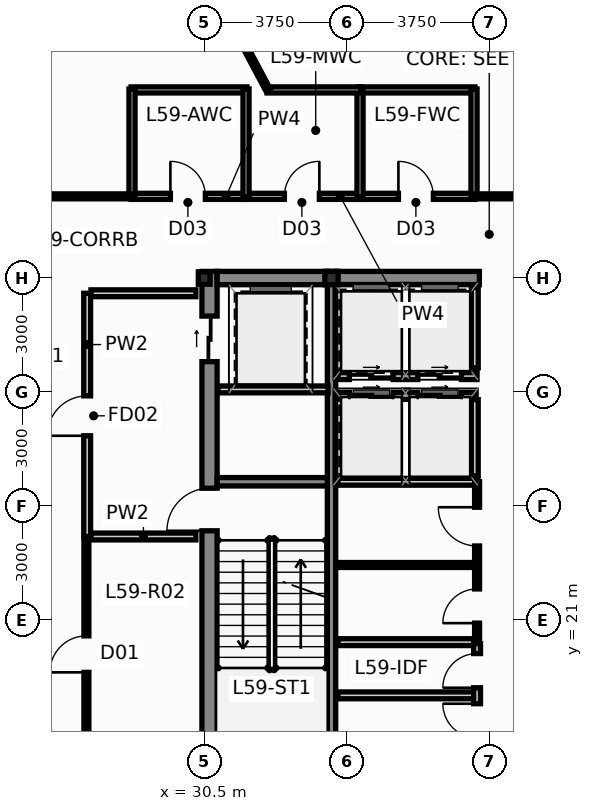
"""IFC4 building model, lengths in metres.
Left out: names, types, materials, properties, quantities, classifications, styles, units other than length and angle.
Written with IfcOpenShell. Run it as: python <this file> out.ifc"""

import sys

from ifc_helpers import new_model, si_unit, direction, frame, frame_2d, origin, origin_2d, place, context, subcontext, project, spatial, rectangle, hollow_rectangle, i_section, extrude, source, transform, mapped, element, fill, save


model = new_model("IFC4")
c1 = context("Model", 3, precision=1e-05, world=origin(), true_north=direction((0.0, 1.0)))
c2 = subcontext(c1, "Body", "Model", "MODEL_VIEW")
j1 = project(units=[si_unit("LENGTHUNIT", "METRE"), si_unit("PLANEANGLEUNIT", "RADIAN")], contexts=[c1])
p1 = place(None, origin())
s1 = spatial("IfcSite", under=j1, at=p1, CompositionType="ELEMENT")
p2 = place(p1, origin())
s2 = spatial("IfcBuilding", under=s1, at=p2, CompositionType="ELEMENT")
p3 = place(p2, frame((0.0, 0.0, 225.35)))
s3 = spatial("IfcBuildingStorey", under=s2, at=p3, CompositionType="ELEMENT", Elevation=225.35)
m1 = source(origin(), c2, "Body", "SweptSolid", [
    extrude(i_section(OverallWidth=0.311, OverallDepth=0.327, WebThickness=0.016, FlangeThickness=0.025, at=origin_2d()), origin(), (0.0, 0.0, 1.0), 4.5),
])
p4 = place(p3, frame((30.5, 30.0, 0.0), z_axis=(0.0, 0.0, 1.0), x_axis=(1.0, 0.0, 0.0)))
e1 = element("IfcColumn", 1, at=p4, inside=s3, PredefinedType="COLUMN", context=c2, shape_type="MappedRepresentation", body=[
    mapped(m1, transform((0.0, 0.0, 0.0), scale=1.0)),
])
m2 = source(origin(), c2, "Body", "SweptSolid", [
    extrude(hollow_rectangle(XDim=0.35, YDim=0.35, WallThickness=0.016, at=origin_2d()), origin(), (0.0, 0.0, 1.0), 4.5),
])
p5 = place(p3, frame((33.85, 30.0, 0.0), z_axis=(0.0, 0.0, 1.0), x_axis=(1.0, 0.0, 0.0)))
e2 = element("IfcColumn", 2, at=p5, inside=s3, PredefinedType="COLUMN", context=c2, shape_type="MappedRepresentation", body=[
    mapped(m2, transform((0.0, 0.0, 0.0), scale=1.0)),
])
p6 = place(p3, frame((30.64, 17.05, 0.0), z_axis=(0.0, 0.0, 1.0), x_axis=(0.0, 1.0, 0.0)))
e3 = element("IfcWall", 3, at=p6, inside=s3, PredefinedType="SHEAR", context=c2, shape_type="SweptSolid", body=[
    extrude(rectangle(XDim=13.125, YDim=0.4, at=frame_2d((6.562, 0.0))), origin(), (0.0, 0.0, 1.0), 4.5),
])
p7 = place(p6, frame((6.3, 0.0, 0.0)))
e4 = element("IfcOpeningElement", 4, at=p7, cuts=e3, PredefinedType="OPENING", context=c2, shape_type="SweptSolid", body=[
    extrude(rectangle(XDim=1.12, YDim=2.15, at=frame_2d((0.56, 1.075))), frame((0.0, 0.212, 0.0), z_axis=(0.0, -1.0, 0.0), x_axis=(1.0, 0.0, 0.0)), (0.0, 0.0, 1.0), 0.424),
])
p8 = place(p6, frame((10.75, 0.0, 0.0)))
e5 = element("IfcOpeningElement", 5, at=p8, cuts=e3, PredefinedType="OPENING", context=c2, shape_type="SweptSolid", body=[
    extrude(rectangle(XDim=1.2, YDim=2.2, at=frame_2d((0.6, 1.1))), frame((0.0, 0.212, 0.0), z_axis=(0.0, -1.0, 0.0), x_axis=(1.0, 0.0, 0.0)), (0.0, 0.0, 1.0), 0.424),
])
p9 = place(p3, frame((30.84, 30.0, 0.0), z_axis=(0.0, 0.0, 1.0), x_axis=(1.0, 0.0, 0.0)))
e6 = element("IfcWall", 6, at=p9, inside=s3, PredefinedType="SHEAR", context=c2, shape_type="SweptSolid", body=[
    extrude(rectangle(XDim=2.9, YDim=0.35, at=frame_2d((1.45, 0.0))), origin(), (0.0, 0.0, 1.0), 4.5),
])
p10 = place(p3, frame((33.96, 30.0, 0.0), z_axis=(0.0, 0.0, 1.0), x_axis=(1.0, 0.0, 0.0)))
e7 = element("IfcWall", 7, at=p10, inside=s3, PredefinedType="SHEAR", context=c2, shape_type="SweptSolid", body=[
    extrude(rectangle(XDim=3.78, YDim=0.35, at=frame_2d((1.89, 0.0))), origin(), (0.0, 0.0, 1.0), 4.5),
])
p11 = place(p3, frame((33.85, 17.05, 0.0), z_axis=(0.0, 0.0, 1.0), x_axis=(0.0, 1.0, 0.0)))
e8 = element("IfcWall", 8, at=p11, inside=s3, PredefinedType="SHEAR", context=c2, shape_type="SweptSolid", body=[
    extrude(rectangle(XDim=13.125, YDim=0.22, at=frame_2d((6.562, 0.0))), origin(), (0.0, 0.0, 1.0), 4.5),
])
p12 = place(p3, frame((30.84, 24.64, 0.0), z_axis=(0.0, 0.0, 1.0), x_axis=(1.0, 0.0, 0.0)))
e9 = element("IfcWall", 9, at=p12, inside=s3, PredefinedType="SHEAR", context=c2, shape_type="SweptSolid", body=[
    extrude(rectangle(XDim=2.9, YDim=0.22, at=frame_2d((1.45, 0.0))), origin(), (0.0, 0.0, 1.0), 4.5),
])
p13 = place(p3, frame((34.02, 26.9, 0.0), z_axis=(0.0, 0.0, 1.0), x_axis=(1.0, 0.0, 0.0)))
e10 = element("IfcWall", 10, at=p13, inside=s3, PredefinedType="PARTITIONING", context=c2, shape_type="SweptSolid", body=[
    extrude(rectangle(XDim=3.6, YDim=0.18, at=frame_2d((1.8, 0.0))), origin(), (0.0, 0.0, 1.0), 4.25),
])
p14 = place(p13, frame((0.3, 0.0, 0.0)))
e11 = element("IfcOpeningElement", 11, at=p14, cuts=e10, PredefinedType="OPENING", context=c2, shape_type="SweptSolid", body=[
    extrude(rectangle(XDim=1.15, YDim=2.2, at=frame_2d((0.575, 1.1))), frame((0.0, 0.102, 0.0), z_axis=(0.0, -1.0, 0.0), x_axis=(1.0, 0.0, 0.0)), (0.0, 0.0, 1.0), 0.204),
])
p15 = place(p13, frame((2.1, 0.0, 0.0)))
e12 = element("IfcOpeningElement", 12, at=p15, cuts=e10, PredefinedType="OPENING", context=c2, shape_type="SweptSolid", body=[
    extrude(rectangle(XDim=1.15, YDim=2.2, at=frame_2d((0.575, 1.1))), frame((0.0, 0.102, 0.0), z_axis=(0.0, -1.0, 0.0), x_axis=(1.0, 0.0, 0.0)), (0.0, 0.0, 1.0), 0.204),
])
p16 = place(p3, frame((37.62, 24.8, 0.0), z_axis=(0.0, 0.0, 1.0), x_axis=(0.0, 1.0, 0.0)))
e13 = element("IfcWall", 13, at=p16, inside=s3, PredefinedType="PARTITIONING", context=c2, shape_type="SweptSolid", body=[
    extrude(rectangle(XDim=2.0, YDim=0.18, at=frame_2d((1.0, 0.0))), origin(), (0.0, 0.0, 1.0), 4.25),
])
p17 = place(p3, frame((34.02, 24.64, 0.0), z_axis=(0.0, 0.0, 1.0), x_axis=(1.0, 0.0, 0.0)))
e14 = element("IfcWall", 14, at=p17, inside=s3, PredefinedType="PARTITIONING", context=c2, shape_type="SweptSolid", body=[
    extrude(rectangle(XDim=3.68, YDim=0.18, at=frame_2d((1.84, 0.0))), origin(), (0.0, 0.0, 1.0), 4.25),
])
p18 = place(p3, frame((34.02, 27.42, 0.0), z_axis=(0.0, 0.0, 1.0), x_axis=(1.0, 0.0, 0.0)))
e15 = element("IfcWall", 15, at=p18, inside=s3, PredefinedType="PARTITIONING", context=c2, shape_type="SweptSolid", body=[
    extrude(rectangle(XDim=3.66, YDim=0.18, at=frame_2d((1.83, 0.0))), origin(), (0.0, 0.0, 1.0), 4.25),
])
p19 = place(p18, frame((0.3, 0.0, 0.0)))
e16 = element("IfcOpeningElement", 16, at=p19, cuts=e15, PredefinedType="OPENING", context=c2, shape_type="SweptSolid", body=[
    extrude(rectangle(XDim=1.15, YDim=2.2, at=frame_2d((0.575, 1.1))), frame((0.0, 0.102, 0.0), z_axis=(0.0, -1.0, 0.0), x_axis=(1.0, 0.0, 0.0)), (0.0, 0.0, 1.0), 0.204),
])
p20 = place(p18, frame((2.1, 0.0, 0.0)))
e17 = element("IfcOpeningElement", 17, at=p20, cuts=e15, PredefinedType="OPENING", context=c2, shape_type="SweptSolid", body=[
    extrude(rectangle(XDim=1.15, YDim=2.2, at=frame_2d((0.575, 1.1))), frame((0.0, 0.102, 0.0), z_axis=(0.0, -1.0, 0.0), x_axis=(1.0, 0.0, 0.0)), (0.0, 0.0, 1.0), 0.204),
])
p21 = place(p3, frame((37.62, 27.64, 0.0), z_axis=(0.0, 0.0, 1.0), x_axis=(0.0, 1.0, 0.0)))
e18 = element("IfcWall", 18, at=p21, inside=s3, PredefinedType="PARTITIONING", context=c2, shape_type="SweptSolid", body=[
    extrude(rectangle(XDim=2.11, YDim=0.18, at=frame_2d((1.055, 0.0))), origin(), (0.0, 0.0, 1.0), 4.25),
])
p22 = place(p3, frame((27.42, 23.2, 0.0), z_axis=(0.0, 0.0, 1.0), x_axis=(0.0, 1.0, 0.0)))
e19 = element("IfcWall", 19, at=p22, inside=s3, PredefinedType="PARTITIONING", context=c2, shape_type="SweptSolid", body=[
    extrude(rectangle(XDim=6.4, YDim=0.18, at=frame_2d((3.2, 0.0))), origin(), (0.0, 0.0, 1.0), 3.935),
])
p23 = place(p22, frame((2.65, 0.0, 0.0)))
e20 = element("IfcOpeningElement", 20, at=p23, cuts=e19, PredefinedType="OPENING", context=c2, shape_type="SweptSolid", body=[
    extrude(rectangle(XDim=1.05, YDim=2.15, at=frame_2d((0.525, 1.075))), frame((0.0, 0.102, 0.0), z_axis=(0.0, -1.0, 0.0), x_axis=(1.0, 0.0, 0.0)), (0.0, 0.0, 1.0), 0.204),
])
p24 = place(p3, frame((27.52, 23.2, 0.0), z_axis=(0.0, 0.0, 1.0), x_axis=(1.0, 0.0, 0.0)))
e21 = element("IfcWall", 21, at=p24, inside=s3, PredefinedType="PARTITIONING", context=c2, shape_type="SweptSolid", body=[
    extrude(rectangle(XDim=2.76, YDim=0.18, at=frame_2d((1.38, 0.0))), origin(), (0.0, 0.0, 1.0), 4.25),
])
p25 = place(p3, frame((27.52, 29.6, 0.0), z_axis=(0.0, 0.0, 1.0), x_axis=(1.0, 0.0, 0.0)))
e22 = element("IfcWall", 22, at=p25, inside=s3, PredefinedType="PARTITIONING", context=c2, shape_type="SweptSolid", body=[
    extrude(rectangle(XDim=2.76, YDim=0.18, at=frame_2d((1.38, 0.0))), origin(), (0.0, 0.0, 1.0), 3.835),
])
p26 = place(p3, frame((30.86, 27.07, 0.0), z_axis=(0.0, 0.0, 1.0), x_axis=(1.0, 0.0, 0.0)))
e23 = element("IfcWall", 23, at=p26, inside=s3, PredefinedType="PARTITIONING", context=c2, shape_type="SweptSolid", body=[
    extrude(rectangle(XDim=2.9, YDim=0.18, at=frame_2d((1.45, 0.0))), origin(), (0.0, 0.0, 1.0), 4.25),
])
p27 = place(p3, frame((34.02, 20.42, 0.0), z_axis=(0.0, 0.0, 1.0), x_axis=(1.0, 0.0, 0.0)))
e24 = element("IfcWall", 24, at=p27, inside=s3, PredefinedType="PARTITIONING", context=c2, shape_type="SweptSolid", body=[
    extrude(rectangle(XDim=3.64, YDim=0.18, at=frame_2d((1.82, 0.0))), origin(), (0.0, 0.0, 1.0), 4.25),
])
p28 = place(p3, frame((34.02, 22.45, 0.0), z_axis=(0.0, 0.0, 1.0), x_axis=(1.0, 0.0, 0.0)))
e25 = element("IfcWall", 25, at=p28, inside=s3, PredefinedType="PARTITIONING", context=c2, shape_type="SweptSolid", body=[
    extrude(rectangle(XDim=3.58, YDim=0.13, at=frame_2d((1.79, 0.0))), origin(), (0.0, 0.0, 1.0), 4.25),
])
p29 = place(p3, frame((37.68, 20.5, 0.0), z_axis=(0.0, 0.0, 1.0), x_axis=(0.0, 1.0, 0.0)))
e26 = element("IfcWall", 26, at=p29, inside=s3, PredefinedType="PARTITIONING", context=c2, shape_type="SweptSolid", body=[
    extrude(rectangle(XDim=4.14, YDim=0.13, at=frame_2d((2.07, 0.0))), origin(), (0.0, 0.0, 1.0), 4.25),
])
p30 = place(p29, frame((0.42, 0.0, 0.0)))
e27 = element("IfcOpeningElement", 27, at=p30, cuts=e26, PredefinedType="OPENING", context=c2, shape_type="SweptSolid", body=[
    extrude(rectangle(XDim=0.9, YDim=2.1, at=frame_2d((0.45, 1.05))), frame((0.0, 0.077, 0.0), z_axis=(0.0, -1.0, 0.0), x_axis=(1.0, 0.0, 0.0)), (0.0, 0.0, 1.0), 0.154),
])
p31 = place(p29, frame((2.45, 0.0, 0.0)))
e28 = element("IfcOpeningElement", 28, at=p31, cuts=e26, PredefinedType="OPENING", context=c2, shape_type="SweptSolid", body=[
    extrude(rectangle(XDim=1.02, YDim=2.15, at=frame_2d((0.51, 1.075))), frame((0.0, 0.077, 0.0), z_axis=(0.0, -1.0, 0.0), x_axis=(1.0, 0.0, 0.0)), (0.0, 0.0, 1.0), 0.154),
])
p32 = place(p3, frame((34.02, 19.02, 0.0), z_axis=(0.0, 0.0, 1.0), x_axis=(1.0, 0.0, 0.0)))
e29 = element("IfcWall", 29, at=p32, inside=s3, PredefinedType="PARTITIONING", context=c2, shape_type="SweptSolid", body=[
    extrude(rectangle(XDim=3.58, YDim=0.18, at=frame_2d((1.79, 0.0))), origin(), (0.0, 0.0, 1.0), 4.25),
])
p33 = place(p3, frame((37.68, 17.68, 0.0), z_axis=(0.0, 0.0, 1.0), x_axis=(0.0, 1.0, 0.0)))
e30 = element("IfcWall", 30, at=p33, inside=s3, PredefinedType="PARTITIONING", context=c2, shape_type="SweptSolid", body=[
    extrude(rectangle(XDim=2.7, YDim=0.18, at=frame_2d((1.35, 0.0))), origin(), (0.0, 0.0, 1.0), 4.25),
])
p34 = place(p33, frame((0.22, 0.0, 0.0)))
e31 = element("IfcOpeningElement", 31, at=p34, cuts=e30, PredefinedType="OPENING", context=c2, shape_type="SweptSolid", body=[
    extrude(rectangle(XDim=0.9, YDim=2.1, at=frame_2d((0.45, 1.05))), frame((0.0, 0.102, 0.0), z_axis=(0.0, -1.0, 0.0), x_axis=(1.0, 0.0, 0.0)), (0.0, 0.0, 1.0), 0.204),
])
p35 = place(p33, frame((1.54, 0.0, 0.0)))
e32 = element("IfcOpeningElement", 32, at=p35, cuts=e30, PredefinedType="OPENING", context=c2, shape_type="SweptSolid", body=[
    extrude(rectangle(XDim=0.9, YDim=2.1, at=frame_2d((0.45, 1.05))), frame((0.0, 0.102, 0.0), z_axis=(0.0, -1.0, 0.0), x_axis=(1.0, 0.0, 0.0)), (0.0, 0.0, 1.0), 0.204),
])
p36 = place(p3, frame((28.575, 32.15, 0.0), z_axis=(0.0, 0.0, 1.0), x_axis=(1.0, 0.0, 0.0)))
e33 = element("IfcWall", 33, at=p36, inside=s3, PredefinedType="PLUMBINGWALL", context=c2, shape_type="SweptSolid", body=[
    extrude(rectangle(XDim=3.05, YDim=0.16, at=frame_2d((1.525, 0.0))), origin(), (0.0, 0.0, 1.0), 3.935),
])
p37 = place(p36, frame((1.035, 0.0, 0.0)))
e34 = element("IfcOpeningElement", 34, at=p37, cuts=e33, PredefinedType="OPENING", context=c2, shape_type="SweptSolid", body=[
    extrude(rectangle(XDim=0.92, YDim=2.1, at=frame_2d((0.46, 1.05))), frame((0.0, 0.092, 0.0), z_axis=(0.0, -1.0, 0.0), x_axis=(1.0, 0.0, 0.0)), (0.0, 0.0, 1.0), 0.184),
])
p38 = place(p3, frame((31.575, 32.15, 0.0), z_axis=(0.0, 0.0, 1.0), x_axis=(1.0, 0.0, 0.0)))
e35 = element("IfcWall", 35, at=p38, inside=s3, PredefinedType="PLUMBINGWALL", context=c2, shape_type="SweptSolid", body=[
    extrude(rectangle(XDim=3.05, YDim=0.16, at=frame_2d((1.525, 0.0))), origin(), (0.0, 0.0, 1.0), 3.935),
])
p39 = place(p38, frame((1.035, 0.0, 0.0)))
e36 = element("IfcOpeningElement", 36, at=p39, cuts=e35, PredefinedType="OPENING", context=c2, shape_type="SweptSolid", body=[
    extrude(rectangle(XDim=0.92, YDim=2.1, at=frame_2d((0.46, 1.05))), frame((0.0, 0.092, 0.0), z_axis=(0.0, -1.0, 0.0), x_axis=(1.0, 0.0, 0.0)), (0.0, 0.0, 1.0), 0.184),
])
p40 = place(p3, frame((34.575, 32.15, 0.0), z_axis=(0.0, 0.0, 1.0), x_axis=(1.0, 0.0, 0.0)))
e37 = element("IfcWall", 37, at=p40, inside=s3, PredefinedType="PLUMBINGWALL", context=c2, shape_type="SweptSolid", body=[
    extrude(rectangle(XDim=3.05, YDim=0.16, at=frame_2d((1.525, 0.0))), origin(), (0.0, 0.0, 1.0), 3.935),
])
p41 = place(p40, frame((1.035, 0.0, 0.0)))
e38 = element("IfcOpeningElement", 38, at=p41, cuts=e37, PredefinedType="OPENING", context=c2, shape_type="SweptSolid", body=[
    extrude(rectangle(XDim=0.92, YDim=2.1, at=frame_2d((0.46, 1.05))), frame((0.0, 0.092, 0.0), z_axis=(0.0, -1.0, 0.0), x_axis=(1.0, 0.0, 0.0)), (0.0, 0.0, 1.0), 0.184),
])
for number, where, z_axis, x_axis in (
    (39, (28.575, 34.95, 0.0), (0.0, 0.0, 1.0), (1.0, 0.0, 0.0)),
    (40, (37.625, 34.95, 0.0), (0.0, 0.0, 1.0), (-1.0, 0.0, 0.0)),
):
    element("IfcWall", number, at=place(p3, frame(where, z_axis=z_axis, x_axis=x_axis)), inside=s3, PredefinedType="PLUMBINGWALL", context=c2, shape_type="SweptSolid", body=[
        extrude(rectangle(XDim=3.05, YDim=0.16, at=frame_2d((1.525, 0.0))), origin(), (0.0, 0.0, 1.0), 3.935),
    ])
for number, where, z_axis, x_axis in (
    (41, (31.6, 32.125, 0.0), (0.0, 0.0, 1.0), (0.0, 1.0, 0.0)),
    (42, (28.6, 32.125, 0.0), (0.0, 0.0, 1.0), (0.0, 1.0, 0.0)),
):
    element("IfcWall", number, at=place(p3, frame(where, z_axis=z_axis, x_axis=x_axis)), inside=s3, PredefinedType="PLUMBINGWALL", context=c2, shape_type="SweptSolid", body=[
        extrude(rectangle(XDim=2.85, YDim=0.16, at=frame_2d((1.425, 0.0))), origin(), (0.0, 0.0, 1.0), 3.835),
    ])
for number, where, z_axis, x_axis in (
    (43, (34.6, 32.125, 0.0), (0.0, 0.0, 1.0), (0.0, 1.0, 0.0)),
    (44, (37.6, 32.125, 0.0), (0.0, 0.0, 1.0), (0.0, 1.0, 0.0)),
):
    element("IfcWall", number, at=place(p3, frame(where, z_axis=z_axis, x_axis=x_axis)), inside=s3, PredefinedType="PLUMBINGWALL", context=c2, shape_type="SweptSolid", body=[
        extrude(rectangle(XDim=2.85, YDim=0.16, at=frame_2d((1.425, 0.0))), origin(), (0.0, 0.0, 1.0), 4.25),
    ])
p42 = place(p3, frame((32.155, 34.95, 0.0), z_axis=(0.0, 0.0, 1.0), x_axis=(1.0, 0.0, 0.0)))
e45 = element("IfcWall", 45, at=p42, inside=s3, PredefinedType="PLUMBINGWALL", context=c2, shape_type="SweptSolid", body=[
    extrude(rectangle(XDim=2.47, YDim=0.16, at=frame_2d((1.235, 0.0))), origin(), (0.0, 0.0, 1.0), 3.935),
])
p43 = place(p3, frame((28.854, 41.188, 0.0), z_axis=(0.0, 0.0, 1.0), x_axis=(0.470464460638, -0.882418943177, 0.0)))
e46 = element("IfcWall", 46, at=p43, inside=s3, PredefinedType="PARTITIONING", context=c2, shape_type="SweptSolid", body=[
    extrude(rectangle(XDim=7.064, YDim=0.13, at=frame_2d((3.532, 0.0))), origin(), (0.0, 0.0, 1.0), 4.25),
])
p44 = place(p3, frame((27.4, 17.105, 0.0), z_axis=(0.0, 0.0, 1.0), x_axis=(0.0, 1.0, 0.0)))
e47 = element("IfcWall", 47, at=p44, inside=s3, PredefinedType="PARTITIONING", context=c2, shape_type="SweptSolid", body=[
    extrude(rectangle(XDim=6.0, YDim=0.13, at=frame_2d((3.0, 0.0))), origin(), (0.0, 0.0, 1.0), 3.935),
])
p45 = place(p44, frame((2.52, 0.0, 0.0)))
e48 = element("IfcOpeningElement", 48, at=p45, cuts=e47, PredefinedType="OPENING", context=c2, shape_type="SweptSolid", body=[
    extrude(rectangle(XDim=0.96, YDim=2.15, at=frame_2d((0.48, 1.075))), frame((0.0, 0.077, 0.0), z_axis=(0.0, -1.0, 0.0), x_axis=(1.0, 0.0, 0.0)), (0.0, 0.0, 1.0), 0.154),
])
p46 = place(p3, frame((37.605, 32.15, 0.0), z_axis=(0.0, 0.0, 1.0), x_axis=(1.0, 0.0, 0.0)))
e49 = element("IfcWall", 49, at=p46, inside=s3, PredefinedType="PARTITIONING", context=c2, shape_type="SweptSolid", body=[
    extrude(rectangle(XDim=3.52, YDim=0.13, at=frame_2d((1.76, 0.0))), origin(), (0.0, 0.0, 1.0), 3.935),
])
p47 = place(p46, frame((1.28, 0.0, 0.0)))
e50 = element("IfcOpeningElement", 50, at=p47, cuts=e49, PredefinedType="OPENING", context=c2, shape_type="SweptSolid", body=[
    extrude(rectangle(XDim=0.96, YDim=2.15, at=frame_2d((0.48, 1.075))), frame((0.0, 0.077, 0.0), z_axis=(0.0, -1.0, 0.0), x_axis=(1.0, 0.0, 0.0)), (0.0, 0.0, 1.0), 0.154),
])
p48 = place(p3, frame((25.405, 32.15, 0.0), z_axis=(0.0, 0.0, 1.0), x_axis=(1.0, 0.0, 0.0)))
e51 = element("IfcWall", 51, at=p48, inside=s3, PredefinedType="PARTITIONING", context=c2, shape_type="SweptSolid", body=[
    extrude(rectangle(XDim=3.19, YDim=0.13, at=frame_2d((1.595, 0.0))), origin(), (0.0, 0.0, 1.0), 4.25),
])
p49 = place(p7, origin())
e52 = element("IfcDoor", 52, at=p49, inside=s3, OperationType="SINGLE_SWING_LEFT", PredefinedType="DOOR", context=c2, shape_type="SweptSolid", body=[
    extrude(rectangle(XDim=1.12, YDim=2.15, at=frame_2d((0.56, 1.075))), frame((0.0, 0.025, 0.0), z_axis=(0.0, -1.0, 0.0), x_axis=(1.0, 0.0, 0.0)), (0.0, 0.0, 1.0), 0.05),
])
fill(e4, e52)
p50 = place(p8, origin())
e53 = element("IfcDoor", 53, at=p50, inside=s3, OperationType="SLIDING_TO_LEFT", PredefinedType="DOOR", context=c2, shape_type="SweptSolid", body=[
    extrude(rectangle(XDim=1.2, YDim=2.2, at=frame_2d((0.6, 1.1))), frame((0.0, 0.025, 0.0), z_axis=(0.0, -1.0, 0.0), x_axis=(1.0, 0.0, 0.0)), (0.0, 0.0, 1.0), 0.05),
])
fill(e5, e53)
p51 = place(p14, origin())
e54 = element("IfcDoor", 54, at=p51, inside=s3, OperationType="SLIDING_TO_LEFT", PredefinedType="DOOR", context=c2, shape_type="SweptSolid", body=[
    extrude(rectangle(XDim=1.15, YDim=2.2, at=frame_2d((0.575, 1.1))), frame((0.0, 0.025, 0.0), z_axis=(0.0, -1.0, 0.0), x_axis=(1.0, 0.0, 0.0)), (0.0, 0.0, 1.0), 0.05),
])
fill(e11, e54)
p52 = place(p15, origin())
e55 = element("IfcDoor", 55, at=p52, inside=s3, OperationType="SLIDING_TO_RIGHT", PredefinedType="DOOR", context=c2, shape_type="SweptSolid", body=[
    extrude(rectangle(XDim=1.15, YDim=2.2, at=frame_2d((0.575, 1.1))), frame((0.0, 0.025, 0.0), z_axis=(0.0, -1.0, 0.0), x_axis=(1.0, 0.0, 0.0)), (0.0, 0.0, 1.0), 0.05),
])
fill(e12, e55)
p53 = place(p19, origin())
e56 = element("IfcDoor", 56, at=p53, inside=s3, OperationType="SLIDING_TO_RIGHT", PredefinedType="DOOR", context=c2, shape_type="SweptSolid", body=[
    extrude(rectangle(XDim=1.15, YDim=2.2, at=frame_2d((0.575, 1.1))), frame((0.0, 0.025, 0.0), z_axis=(0.0, -1.0, 0.0), x_axis=(1.0, 0.0, 0.0)), (0.0, 0.0, 1.0), 0.05),
])
fill(e16, e56)
p54 = place(p20, origin())
e57 = element("IfcDoor", 57, at=p54, inside=s3, OperationType="SLIDING_TO_LEFT", PredefinedType="DOOR", context=c2, shape_type="SweptSolid", body=[
    extrude(rectangle(XDim=1.15, YDim=2.2, at=frame_2d((0.575, 1.1))), frame((0.0, 0.025, 0.0), z_axis=(0.0, -1.0, 0.0), x_axis=(1.0, 0.0, 0.0)), (0.0, 0.0, 1.0), 0.05),
])
fill(e17, e57)
p55 = place(p23, origin())
e58 = element("IfcDoor", 58, at=p55, inside=s3, OperationType="SINGLE_SWING_LEFT", PredefinedType="DOOR", context=c2, shape_type="SweptSolid", body=[
    extrude(rectangle(XDim=1.05, YDim=2.15, at=frame_2d((0.525, 1.075))), frame((0.0, 0.025, 0.0), z_axis=(0.0, -1.0, 0.0), x_axis=(1.0, 0.0, 0.0)), (0.0, 0.0, 1.0), 0.05),
])
fill(e20, e58)
p56 = place(p30, origin())
e59 = element("IfcDoor", 59, at=p56, inside=s3, OperationType="SINGLE_SWING_LEFT", PredefinedType="DOOR", context=c2, shape_type="SweptSolid", body=[
    extrude(rectangle(XDim=0.9, YDim=2.1, at=frame_2d((0.45, 1.05))), frame((0.0, 0.025, 0.0), z_axis=(0.0, -1.0, 0.0), x_axis=(1.0, 0.0, 0.0)), (0.0, 0.0, 1.0), 0.05),
])
fill(e27, e59)
p57 = place(p31, origin())
e60 = element("IfcDoor", 60, at=p57, inside=s3, OperationType="SINGLE_SWING_RIGHT", PredefinedType="DOOR", context=c2, shape_type="SweptSolid", body=[
    extrude(rectangle(XDim=1.02, YDim=2.15, at=frame_2d((0.51, 1.075))), frame((0.0, 0.025, 0.0), z_axis=(0.0, -1.0, 0.0), x_axis=(1.0, 0.0, 0.0)), (0.0, 0.0, 1.0), 0.05),
])
fill(e28, e60)
p58 = place(p34, origin())
e61 = element("IfcDoor", 61, at=p58, inside=s3, OperationType="SINGLE_SWING_RIGHT", PredefinedType="DOOR", context=c2, shape_type="SweptSolid", body=[
    extrude(rectangle(XDim=0.9, YDim=2.1, at=frame_2d((0.45, 1.05))), frame((0.0, 0.025, 0.0), z_axis=(0.0, -1.0, 0.0), x_axis=(1.0, 0.0, 0.0)), (0.0, 0.0, 1.0), 0.05),
])
fill(e31, e61)
p59 = place(p35, origin())
e62 = element("IfcDoor", 62, at=p59, inside=s3, OperationType="SINGLE_SWING_LEFT", PredefinedType="DOOR", context=c2, shape_type="SweptSolid", body=[
    extrude(rectangle(XDim=0.9, YDim=2.1, at=frame_2d((0.45, 1.05))), frame((0.0, 0.025, 0.0), z_axis=(0.0, -1.0, 0.0), x_axis=(1.0, 0.0, 0.0)), (0.0, 0.0, 1.0), 0.05),
])
fill(e32, e62)
p60 = place(p37, origin())
e63 = element("IfcDoor", 63, at=p60, inside=s3, OperationType="SINGLE_SWING_LEFT", PredefinedType="DOOR", context=c2, shape_type="SweptSolid", body=[
    extrude(rectangle(XDim=0.92, YDim=2.1, at=frame_2d((0.46, 1.05))), frame((0.0, 0.025, 0.0), z_axis=(0.0, -1.0, 0.0), x_axis=(1.0, 0.0, 0.0)), (0.0, 0.0, 1.0), 0.05),
])
fill(e34, e63)
p61 = place(p39, origin())
e64 = element("IfcDoor", 64, at=p61, inside=s3, OperationType="SINGLE_SWING_RIGHT", PredefinedType="DOOR", context=c2, shape_type="SweptSolid", body=[
    extrude(rectangle(XDim=0.92, YDim=2.1, at=frame_2d((0.46, 1.05))), frame((0.0, 0.025, 0.0), z_axis=(0.0, -1.0, 0.0), x_axis=(1.0, 0.0, 0.0)), (0.0, 0.0, 1.0), 0.05),
])
fill(e36, e64)
p62 = place(p41, origin())
e65 = element("IfcDoor", 65, at=p62, inside=s3, OperationType="SINGLE_SWING_LEFT", PredefinedType="DOOR", context=c2, shape_type="SweptSolid", body=[
    extrude(rectangle(XDim=0.92, YDim=2.1, at=frame_2d((0.46, 1.05))), frame((0.0, 0.025, 0.0), z_axis=(0.0, -1.0, 0.0), x_axis=(1.0, 0.0, 0.0)), (0.0, 0.0, 1.0), 0.05),
])
fill(e38, e65)
p63 = place(p45, origin())
e66 = element("IfcDoor", 66, at=p63, inside=s3, OperationType="SINGLE_SWING_LEFT", PredefinedType="DOOR", context=c2, shape_type="SweptSolid", body=[
    extrude(rectangle(XDim=0.96, YDim=2.15, at=frame_2d((0.48, 1.075))), frame((0.0, 0.025, 0.0), z_axis=(0.0, -1.0, 0.0), x_axis=(1.0, 0.0, 0.0)), (0.0, 0.0, 1.0), 0.05),
])
fill(e48, e66)
save(model, sys.argv[1])
